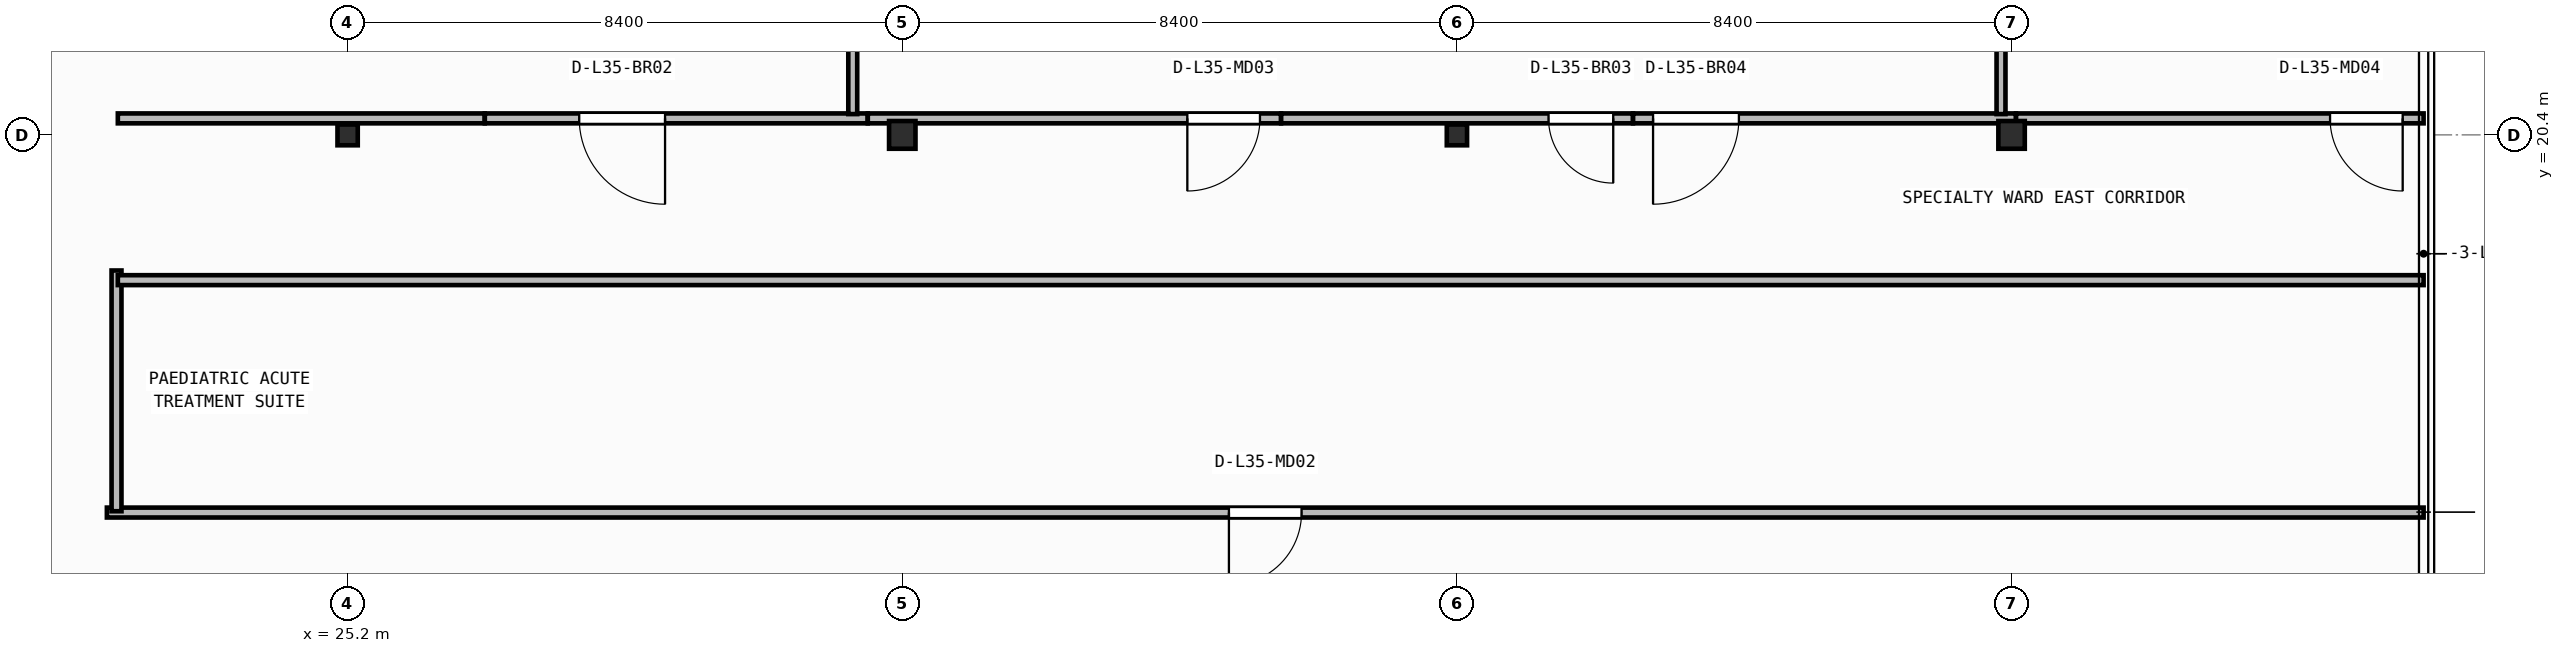
"""IFC4 building model, lengths in metres.
Left out: names, types, materials, properties, quantities, classifications, styles, units other than length and angle.
Written with IfcOpenShell. Run it as: python <this file> out.ifc"""

import sys

from ifc_helpers import new_model, si_unit, direction, frame, frame_2d, origin, origin_2d, place, context, subcontext, project, spatial, rectangle, i_section, extrude, element, fill, save


model = new_model("IFC4")
c1 = context("Model", 3, precision=1e-05, world=origin(), true_north=direction((0.0, 1.0)))
c2 = subcontext(c1, "Body", "Model", "MODEL_VIEW")
j1 = project(units=[si_unit("LENGTHUNIT", "METRE"), si_unit("PLANEANGLEUNIT", "RADIAN")], contexts=[c1])
p1 = place(None, origin())
s1 = spatial("IfcSite", under=j1, at=p1, CompositionType="ELEMENT")
p2 = place(p1, origin())
s2 = spatial("IfcBuilding", under=s1, at=p2, CompositionType="ELEMENT")
p3 = place(p2, frame((0.0, 0.0, 142.85)))
s3 = spatial("IfcBuildingStorey", under=s2, at=p3, CompositionType="ELEMENT", Elevation=142.85)
p4 = place(p3, frame((25.2, 20.4, 0.0), z_axis=(0.0, 0.0, 1.0), x_axis=(1.0, 0.0, 0.0)))
e1 = element("IfcColumn", 1, at=p4, inside=s3, PredefinedType="COLUMN", context=c2, shape_type="SweptSolid", body=[
    extrude(i_section(OverallWidth=0.307, OverallDepth=0.315, WebThickness=0.012, FlangeThickness=0.019, FilletRadius=0.017, at=origin_2d()), origin(), (0.0, 0.0, 1.0), 3.95),
])
p5 = place(p3, frame((33.6, 20.4, 0.0), z_axis=(0.0, 0.0, 1.0), x_axis=(1.0, 0.0, 0.0)))
e2 = element("IfcColumn", 2, at=p5, inside=s3, PredefinedType="COLUMN", context=c2, shape_type="SweptSolid", body=[
    extrude(i_section(OverallWidth=0.4, OverallDepth=0.42, WebThickness=0.025, FlangeThickness=0.04, at=origin_2d()), origin(), (0.0, 0.0, 1.0), 3.95),
])
p6 = place(p3, frame((42.0, 20.4, 0.0), z_axis=(0.0, 0.0, 1.0), x_axis=(1.0, 0.0, 0.0)))
e3 = element("IfcColumn", 3, at=p6, inside=s3, PredefinedType="COLUMN", context=c2, shape_type="SweptSolid", body=[
    extrude(i_section(OverallWidth=0.307, OverallDepth=0.315, WebThickness=0.012, FlangeThickness=0.019, FilletRadius=0.017, at=origin_2d()), origin(), (0.0, 0.0, 1.0), 3.95),
])
p7 = place(p3, frame((50.4, 20.4, 0.0), z_axis=(0.0, 0.0, 1.0), x_axis=(1.0, 0.0, 0.0)))
e4 = element("IfcColumn", 4, at=p7, inside=s3, PredefinedType="COLUMN", context=c2, shape_type="SweptSolid", body=[
    extrude(i_section(OverallWidth=0.4, OverallDepth=0.42, WebThickness=0.025, FlangeThickness=0.04, at=origin_2d()), origin(), (0.0, 0.0, 1.0), 3.95),
])
p8 = place(p3, frame((56.64, 14.68, 0.0), z_axis=(0.0, 0.0, 1.0), x_axis=(-1.0, 0.0, 0.0)))
e5 = element("IfcWall", 5, at=p8, inside=s3, PredefinedType="PARTITIONING", context=c2, shape_type="SweptSolid", body=[
    extrude(rectangle(XDim=35.086, YDim=0.15, at=frame_2d((17.543, 0.0))), origin(), (0.0, 0.0, 1.0), 3.71),
])
p9 = place(p8, frame((16.993, 0.0, 0.0)))
e6 = element("IfcOpeningElement", 6, at=p9, cuts=e5, PredefinedType="OPENING", context=c2, shape_type="SweptSolid", body=[
    extrude(rectangle(XDim=1.1, YDim=2.1, at=frame_2d((0.55, 1.05))), frame((0.0, 0.085, 0.0), z_axis=(0.0, -1.0, 0.0), x_axis=(1.0, 0.0, 0.0)), (0.0, 0.0, 1.0), 0.17),
])
p10 = place(p3, frame((21.7, 14.7, 0.0), z_axis=(0.0, 0.0, 1.0), x_axis=(0.0, 1.0, 0.0)))
e7 = element("IfcWall", 7, at=p10, inside=s3, PredefinedType="PARTITIONING", context=c2, shape_type="SweptSolid", body=[
    extrude(rectangle(XDim=3.646, YDim=0.15, at=frame_2d((1.823, 0.0))), origin(), (0.0, 0.0, 1.0), 3.71),
])
p11 = place(p3, frame((21.72, 18.2, 0.0), z_axis=(0.0, 0.0, 1.0), x_axis=(1.0, 0.0, 0.0)))
e8 = element("IfcWall", 8, at=p11, inside=s3, PredefinedType="PARTITIONING", context=c2, shape_type="SweptSolid", body=[
    extrude(rectangle(XDim=34.92, YDim=0.15, at=frame_2d((17.46, 0.0))), origin(), (0.0, 0.0, 1.0), 3.71),
])
p12 = place(p3, frame((27.276, 20.65, 0.0), z_axis=(0.0, 0.0, 1.0), x_axis=(-1.0, 0.0, 0.0)))
e9 = element("IfcWall", 9, at=p12, inside=s3, PredefinedType="PARTITIONING", context=c2, shape_type="SweptSolid", body=[
    extrude(rectangle(XDim=5.556, YDim=0.15, at=frame_2d((2.778, 0.0))), origin(), (0.0, 0.0, 1.0), 3.083),
])
p13 = place(p3, frame((33.076, 20.65, 0.0), z_axis=(0.0, 0.0, 1.0), x_axis=(-1.0, 0.0, 0.0)))
e10 = element("IfcWall", 10, at=p13, inside=s3, PredefinedType="PARTITIONING", context=c2, shape_type="SweptSolid", body=[
    extrude(rectangle(XDim=5.798, YDim=0.15, at=frame_2d((2.899, 0.0))), origin(), (0.0, 0.0, 1.0), 3.083),
])
p14 = place(p13, frame((3.069, 0.0, 0.0)))
e11 = element("IfcOpeningElement", 11, at=p14, cuts=e10, PredefinedType="OPENING", context=c2, shape_type="SweptSolid", body=[
    extrude(rectangle(XDim=1.3, YDim=2.15, at=frame_2d((0.65, 1.075))), frame((0.0, 0.085, 0.0), z_axis=(0.0, -1.0, 0.0), x_axis=(1.0, 0.0, 0.0)), (0.0, 0.0, 1.0), 0.17),
])
p15 = place(p3, frame((39.336, 20.65, 0.0), z_axis=(0.0, 0.0, 1.0), x_axis=(-1.0, 0.0, 0.0)))
e12 = element("IfcWall", 12, at=p15, inside=s3, PredefinedType="PARTITIONING", context=c2, shape_type="SweptSolid", body=[
    extrude(rectangle(XDim=6.258, YDim=0.15, at=frame_2d((3.129, 0.0))), origin(), (0.0, 0.0, 1.0), 3.083),
])
p16 = place(p15, frame((0.319, 0.0, 0.0)))
e13 = element("IfcOpeningElement", 13, at=p16, cuts=e12, PredefinedType="OPENING", context=c2, shape_type="SweptSolid", body=[
    extrude(rectangle(XDim=1.1, YDim=2.1, at=frame_2d((0.55, 1.05))), frame((0.0, 0.085, 0.0), z_axis=(0.0, -1.0, 0.0), x_axis=(1.0, 0.0, 0.0)), (0.0, 0.0, 1.0), 0.17),
])
p17 = place(p3, frame((44.666, 20.65, 0.0), z_axis=(0.0, 0.0, 1.0), x_axis=(-1.0, 0.0, 0.0)))
e14 = element("IfcWall", 14, at=p17, inside=s3, PredefinedType="PARTITIONING", context=c2, shape_type="SweptSolid", body=[
    extrude(rectangle(XDim=5.328, YDim=0.15, at=frame_2d((2.664, 0.0))), origin(), (0.0, 0.0, 1.0), 3.083),
])
p18 = place(p17, frame((0.299, 0.0, 0.0)))
e15 = element("IfcOpeningElement", 15, at=p18, cuts=e14, PredefinedType="OPENING", context=c2, shape_type="SweptSolid", body=[
    extrude(rectangle(XDim=0.98, YDim=2.1, at=frame_2d((0.49, 1.05))), frame((0.0, 0.085, 0.0), z_axis=(0.0, -1.0, 0.0), x_axis=(1.0, 0.0, 0.0)), (0.0, 0.0, 1.0), 0.17),
])
p19 = place(p3, frame((50.466, 20.65, 0.0), z_axis=(0.0, 0.0, 1.0), x_axis=(-1.0, 0.0, 0.0)))
e16 = element("IfcWall", 16, at=p19, inside=s3, PredefinedType="PARTITIONING", context=c2, shape_type="SweptSolid", body=[
    extrude(rectangle(XDim=5.798, YDim=0.15, at=frame_2d((2.899, 0.0))), origin(), (0.0, 0.0, 1.0), 3.083),
])
p20 = place(p19, frame((4.196, 0.0, 0.0)))
e17 = element("IfcOpeningElement", 17, at=p20, cuts=e16, PredefinedType="OPENING", context=c2, shape_type="SweptSolid", body=[
    extrude(rectangle(XDim=1.3, YDim=2.15, at=frame_2d((0.65, 1.075))), frame((0.0, 0.085, 0.0), z_axis=(0.0, -1.0, 0.0), x_axis=(1.0, 0.0, 0.0)), (0.0, 0.0, 1.0), 0.17),
])
p21 = place(p3, frame((56.64, 20.65, 0.0), z_axis=(0.0, 0.0, 1.0), x_axis=(-1.0, 0.0, 0.0)))
e18 = element("IfcWall", 18, at=p21, inside=s3, PredefinedType="PARTITIONING", context=c2, shape_type="SweptSolid", body=[
    extrude(rectangle(XDim=6.172, YDim=0.15, at=frame_2d((3.086, 0.0))), origin(), (0.0, 0.0, 1.0), 3.71),
])
p22 = place(p21, frame((0.317, 0.0, 0.0)))
e19 = element("IfcOpeningElement", 19, at=p22, cuts=e18, PredefinedType="OPENING", context=c2, shape_type="SweptSolid", body=[
    extrude(rectangle(XDim=1.1, YDim=2.1, at=frame_2d((0.55, 1.05))), frame((0.0, 0.085, 0.0), z_axis=(0.0, -1.0, 0.0), x_axis=(1.0, 0.0, 0.0)), (0.0, 0.0, 1.0), 0.17),
])
p23 = place(p3, frame((32.85, 20.715, 0.0), z_axis=(0.0, 0.0, 1.0), x_axis=(0.0, 1.0, 0.0)))
e20 = element("IfcWall", 20, at=p23, inside=s3, PredefinedType="PARTITIONING", context=c2, shape_type="SweptSolid", body=[
    extrude(rectangle(XDim=6.385, YDim=0.135, at=frame_2d((3.192, 0.0))), origin(), (0.0, 0.0, 1.0), 3.71),
])
p24 = place(p3, frame((50.24, 20.715, 0.0), z_axis=(0.0, 0.0, 1.0), x_axis=(0.0, 1.0, 0.0)))
e21 = element("IfcWall", 21, at=p24, inside=s3, PredefinedType="PARTITIONING", context=c2, shape_type="SweptSolid", body=[
    extrude(rectangle(XDim=6.385, YDim=0.135, at=frame_2d((3.192, 0.0))), origin(), (0.0, 0.0, 1.0), 3.152),
])
p25 = place(p9, origin())
e22 = element("IfcDoor", 22, at=p25, inside=s3, OperationType="SINGLE_SWING_RIGHT", PredefinedType="DOOR", context=c2, shape_type="SweptSolid", body=[
    extrude(rectangle(XDim=1.1, YDim=2.1, at=frame_2d((0.55, 1.05))), frame((0.0, 0.025, 0.0), z_axis=(0.0, -1.0, 0.0), x_axis=(1.0, 0.0, 0.0)), (0.0, 0.0, 1.0), 0.05),
])
fill(e6, e22)
p26 = place(p14, origin())
e23 = element("IfcDoor", 23, at=p26, inside=s3, OperationType="SINGLE_SWING_LEFT", PredefinedType="DOOR", context=c2, shape_type="SweptSolid", body=[
    extrude(rectangle(XDim=1.3, YDim=2.15, at=frame_2d((0.65, 1.075))), frame((0.0, 0.025, 0.0), z_axis=(0.0, -1.0, 0.0), x_axis=(1.0, 0.0, 0.0)), (0.0, 0.0, 1.0), 0.05),
])
fill(e11, e23)
p27 = place(p16, origin())
e24 = element("IfcDoor", 24, at=p27, inside=s3, OperationType="SINGLE_SWING_RIGHT", PredefinedType="DOOR", context=c2, shape_type="SweptSolid", body=[
    extrude(rectangle(XDim=1.1, YDim=2.1, at=frame_2d((0.55, 1.05))), frame((0.0, 0.025, 0.0), z_axis=(0.0, -1.0, 0.0), x_axis=(1.0, 0.0, 0.0)), (0.0, 0.0, 1.0), 0.05),
])
fill(e13, e24)
p28 = place(p18, origin())
e25 = element("IfcDoor", 25, at=p28, inside=s3, OperationType="SINGLE_SWING_LEFT", PredefinedType="DOOR", context=c2, shape_type="SweptSolid", body=[
    extrude(rectangle(XDim=0.98, YDim=2.1, at=frame_2d((0.49, 1.05))), frame((0.0, 0.025, 0.0), z_axis=(0.0, -1.0, 0.0), x_axis=(1.0, 0.0, 0.0)), (0.0, 0.0, 1.0), 0.05),
])
fill(e15, e25)
p29 = place(p20, origin())
e26 = element("IfcDoor", 26, at=p29, inside=s3, OperationType="SINGLE_SWING_RIGHT", PredefinedType="DOOR", context=c2, shape_type="SweptSolid", body=[
    extrude(rectangle(XDim=1.3, YDim=2.15, at=frame_2d((0.65, 1.075))), frame((0.0, 0.025, 0.0), z_axis=(0.0, -1.0, 0.0), x_axis=(1.0, 0.0, 0.0)), (0.0, 0.0, 1.0), 0.05),
])
fill(e17, e26)
p30 = place(p22, origin())
e27 = element("IfcDoor", 27, at=p30, inside=s3, OperationType="SINGLE_SWING_LEFT", PredefinedType="DOOR", context=c2, shape_type="SweptSolid", body=[
    extrude(rectangle(XDim=1.1, YDim=2.1, at=frame_2d((0.55, 1.05))), frame((0.0, 0.025, 0.0), z_axis=(0.0, -1.0, 0.0), x_axis=(1.0, 0.0, 0.0)), (0.0, 0.0, 1.0), 0.05),
])
fill(e19, e27)
save(model, sys.argv[1])
